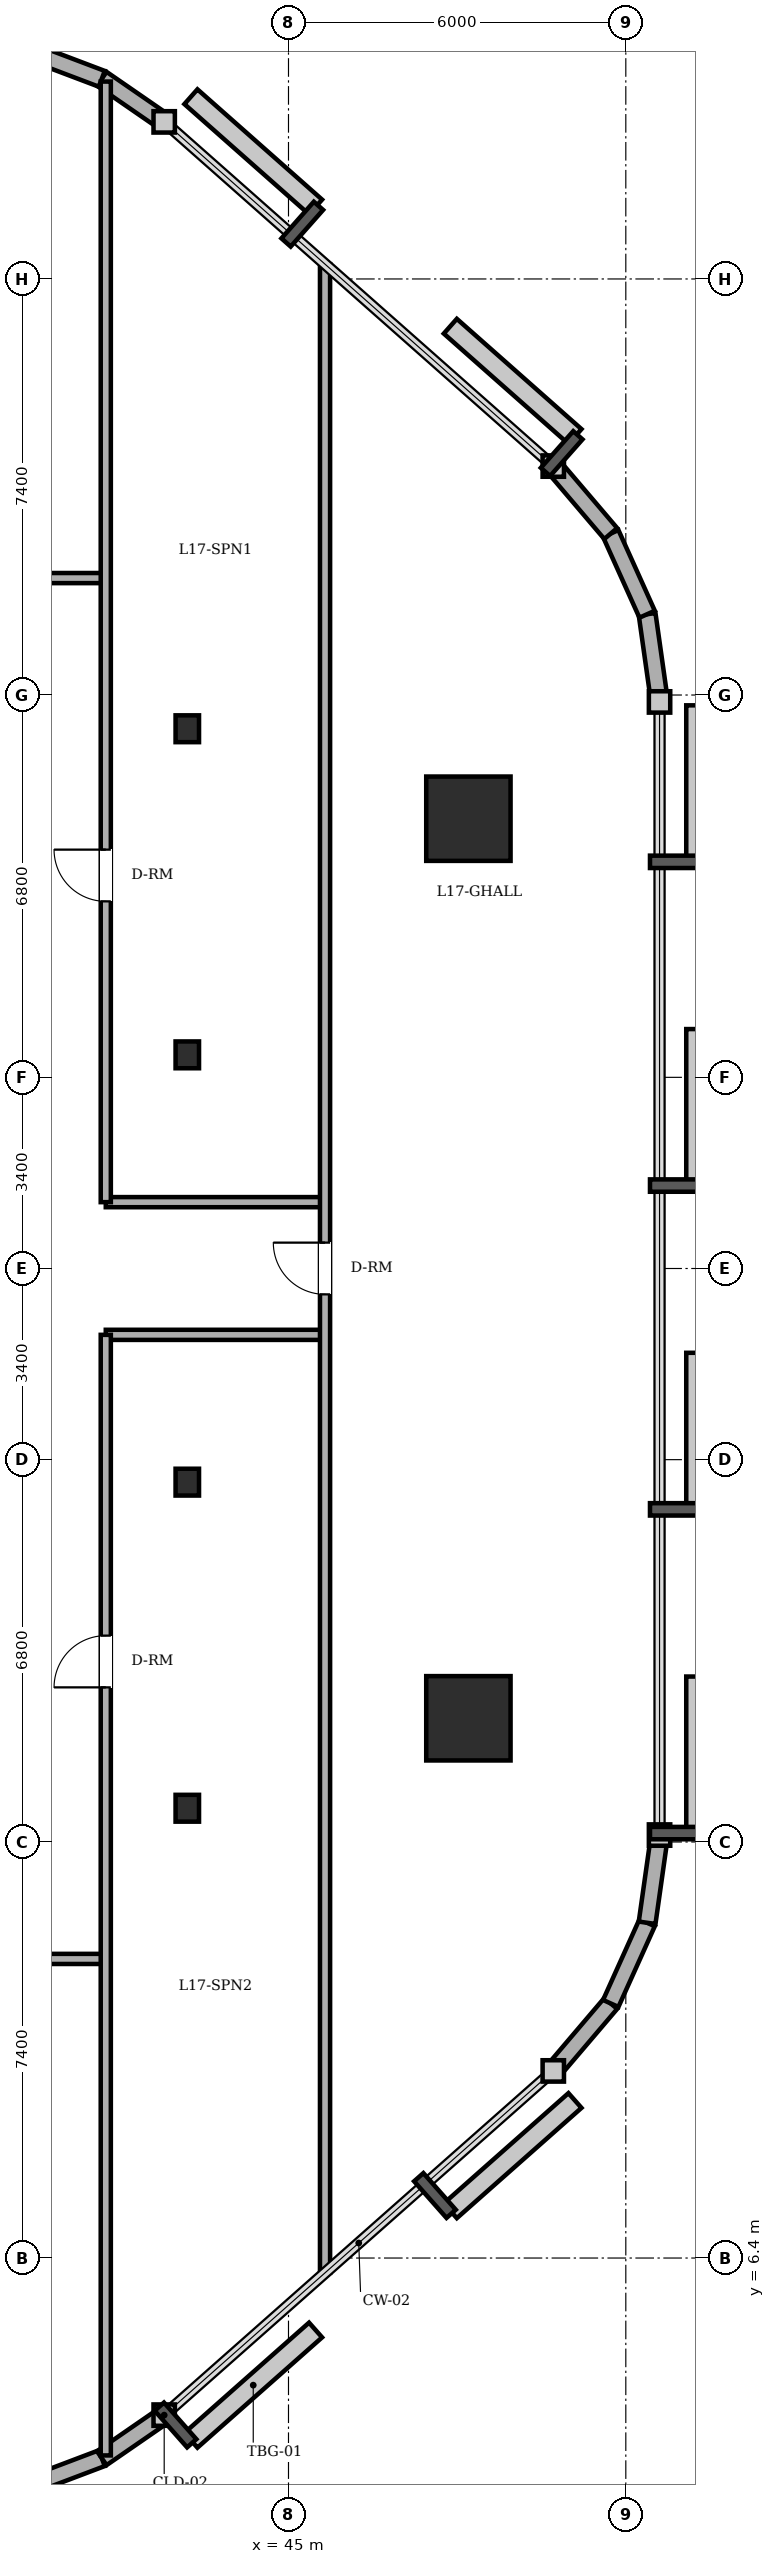
"""IFC4 building model, lengths in metres.
Left out: names, types, materials, properties, quantities, classifications, styles, units other than length and angle.
Written with IfcOpenShell. Run it as: python <this file> out.ifc"""

import sys

from ifc_helpers import new_model, si_unit, direction, frame, frame_2d, origin, origin_2d, place, context, subcontext, project, spatial, rectangle, circle, i_section, extrude, element, fill, save


model = new_model("IFC4")
c1 = context("Model", 3, precision=1e-05, world=origin(), true_north=direction((0.0, 1.0)))
c2 = subcontext(c1, "Body", "Model", "MODEL_VIEW")
j1 = project(units=[si_unit("LENGTHUNIT", "METRE"), si_unit("PLANEANGLEUNIT", "RADIAN")], contexts=[c1])
p1 = place(None, origin())
s1 = spatial("IfcSite", under=j1, at=p1, CompositionType="ELEMENT")
p2 = place(p1, origin())
s2 = spatial("IfcBuilding", under=s1, at=p2, CompositionType="ELEMENT")
p3 = place(p2, frame((0.0, 0.0, 64.8)))
s3 = spatial("IfcBuildingStorey", under=s2, at=p3, CompositionType="ELEMENT", Elevation=64.8)
for number, where, z_axis, x_axis in (
    (1, (48.2, 16.0, 0.0), (0.0, 0.0, 1.0), (1.0, 0.0, 0.0)),
    (2, (48.2, 32.0, 0.0), (0.0, 0.0, 1.0), (1.0, 0.0, 0.0)),
):
    element("IfcColumn", number, at=place(p3, frame(where, z_axis=z_axis, x_axis=x_axis)), inside=s3, PredefinedType="COLUMN", context=c2, shape_type="SweptSolid", body=[
        extrude(circle(Radius=0.75, at=origin_2d()), origin(), (0.0, 0.0, 1.0), 3.6),
    ])
for number, where, z_axis, x_axis in (
    (3, (43.2, 14.4, 0.0), (0.0, 0.0, 1.0), (1.0, 0.0, 0.0)),
    (4, (43.2, 20.2, 0.0), (0.0, 0.0, 1.0), (1.0, 0.0, 0.0)),
    (5, (43.2, 27.8, 0.0), (0.0, 0.0, 1.0), (1.0, 0.0, 0.0)),
    (6, (43.2, 33.6, 0.0), (0.0, 0.0, 1.0), (1.0, 0.0, 0.0)),
):
    element("IfcColumn", number, at=place(p3, frame(where, z_axis=z_axis, x_axis=x_axis)), inside=s3, PredefinedType="COLUMN", context=c2, shape_type="SweptSolid", body=[
        extrude(i_section(OverallWidth=0.417, OverallDepth=0.477, WebThickness=0.036, FlangeThickness=0.057, FilletRadius=0.015, at=origin_2d()), origin(), (0.0, 0.0, 1.0), 3.6),
    ])
p4 = place(p3, frame((40.417, 2.362, 0.0), z_axis=(0.0, 0.0, 1.0), x_axis=(0.935156721165, 0.354234254216, 0.0)))
e7 = element("IfcWall", 7, at=p4, inside=s3, PredefinedType="SOLIDWALL", context=c2, shape_type="SweptSolid", body=[
    extrude(rectangle(XDim=1.349, YDim=0.3, at=frame_2d((0.675, 0.0))), origin(), (0.0, 0.0, 1.0), 3.4),
])
p5 = place(p3, frame((41.679, 2.84, 0.0), z_axis=(0.0, 0.0, 1.0), x_axis=(0.823116500192, 0.567872544777, 0.0)))
e8 = element("IfcWall", 8, at=p5, inside=s3, PredefinedType="SOLIDWALL", context=c2, shape_type="SweptSolid", body=[
    extrude(rectangle(XDim=1.349, YDim=0.3, at=frame_2d((0.674, 0.0))), origin(), (0.0, 0.0, 1.0), 3.4),
])
p6 = place(p3, frame((49.71, 9.728, 0.0), z_axis=(0.0, 0.0, 1.0), x_axis=(0.648389989909, 0.7613083613, 0.0)))
e9 = element("IfcWall", 9, at=p6, inside=s3, PredefinedType="SOLIDWALL", context=c2, shape_type="SweptSolid", body=[
    extrude(rectangle(XDim=1.576, YDim=0.3, at=frame_2d((0.788, 0.0))), origin(), (0.0, 0.0, 1.0), 3.4),
])
p7 = place(p3, frame((50.732, 10.928, 0.0), z_axis=(0.0, 0.0, 1.0), x_axis=(0.410996558744, 0.911636895206, 0.0)))
e10 = element("IfcWall", 10, at=p7, inside=s3, PredefinedType="SOLIDWALL", context=c2, shape_type="SweptSolid", body=[
    extrude(rectangle(XDim=1.574, YDim=0.3, at=frame_2d((0.787, 0.0))), origin(), (0.0, 0.0, 1.0), 3.4),
])
for number, where, z_axis, x_axis in (
    (11, (51.379, 12.363, 0.0), (0.0, 0.0, 1.0), (0.14, 0.99, 0.0)),
    (12, (51.6, 34.077, 0.0), (0.0, 0.0, 1.0), (-0.14, 0.99, 0.0)),
):
    element("IfcWall", number, at=place(p3, frame(where, z_axis=z_axis, x_axis=x_axis)), inside=s3, PredefinedType="SOLIDWALL", context=c2, shape_type="SweptSolid", body=[
        extrude(rectangle(XDim=1.576, YDim=0.3, at=frame_2d((0.788, 0.0))), origin(), (0.0, 0.0, 1.0), 3.4),
    ])
p8 = place(p3, frame((51.379, 35.637, 0.0), z_axis=(0.0, 0.0, 1.0), x_axis=(-0.410996558744, 0.911636895206, 0.0)))
e13 = element("IfcWall", 13, at=p8, inside=s3, PredefinedType="SOLIDWALL", context=c2, shape_type="SweptSolid", body=[
    extrude(rectangle(XDim=1.574, YDim=0.3, at=frame_2d((0.787, 0.0))), origin(), (0.0, 0.0, 1.0), 3.4),
])
p9 = place(p3, frame((50.732, 37.072, 0.0), z_axis=(0.0, 0.0, 1.0), x_axis=(-0.648389989909, 0.7613083613, 0.0)))
e14 = element("IfcWall", 14, at=p9, inside=s3, PredefinedType="SOLIDWALL", context=c2, shape_type="SweptSolid", body=[
    extrude(rectangle(XDim=1.576, YDim=0.3, at=frame_2d((0.788, 0.0))), origin(), (0.0, 0.0, 1.0), 3.4),
])
p10 = place(p3, frame((42.789, 44.394, 0.0), z_axis=(0.0, 0.0, 1.0), x_axis=(-0.823116500192, 0.567872544777, 0.0)))
e15 = element("IfcWall", 15, at=p10, inside=s3, PredefinedType="SOLIDWALL", context=c2, shape_type="SweptSolid", body=[
    extrude(rectangle(XDim=1.349, YDim=0.3, at=frame_2d((0.674, 0.0))), origin(), (0.0, 0.0, 1.0), 3.4),
])
p11 = place(p3, frame((41.679, 45.16, 0.0), z_axis=(0.0, 0.0, 1.0), x_axis=(-0.935156721165, 0.354234254216, 0.0)))
e16 = element("IfcWall", 16, at=p11, inside=s3, PredefinedType="SOLIDWALL", context=c2, shape_type="SweptSolid", body=[
    extrude(rectangle(XDim=1.349, YDim=0.3, at=frame_2d((0.675, 0.0))), origin(), (0.0, 0.0, 1.0), 3.4),
])
p12 = place(p3, frame((3.4, 11.72, 0.0), z_axis=(0.0, 0.0, 1.0), x_axis=(1.0, 0.0, 0.0)))
e17 = element("IfcWall", 17, at=p12, inside=s3, PredefinedType="PARTITIONING", context=c2, shape_type="SweptSolid", body=[
    extrude(rectangle(XDim=38.35, YDim=0.18, at=frame_2d((19.175, 0.0))), origin(), (0.0, 0.0, 1.0), 3.4),
])
p13 = place(p12, frame((21.24, 0.0, 0.0)))
e18 = element("IfcOpeningElement", 18, at=p13, cuts=e17, PredefinedType="OPENING", context=c2, shape_type="SweptSolid", body=[
    extrude(rectangle(XDim=0.92, YDim=2.1, at=frame_2d((0.46, 1.05))), frame((0.0, 0.1, 0.0), z_axis=(0.0, -1.0, 0.0), x_axis=(1.0, 0.0, 0.0)), (0.0, 0.0, 1.0), 0.2),
])
p14 = place(p12, frame((10.74, 0.0, 0.0)))
e19 = element("IfcOpeningElement", 19, at=p14, cuts=e17, PredefinedType="OPENING", context=c2, shape_type="SweptSolid", body=[
    extrude(rectangle(XDim=0.92, YDim=2.1, at=frame_2d((0.46, 1.05))), frame((0.0, 0.1, 0.0), z_axis=(0.0, -1.0, 0.0), x_axis=(1.0, 0.0, 0.0)), (0.0, 0.0, 1.0), 0.2),
])
p15 = place(p12, frame((30.255, 0.0, 0.0)))
e20 = element("IfcOpeningElement", 20, at=p15, cuts=e17, PredefinedType="OPENING", context=c2, shape_type="SweptSolid", body=[
    extrude(rectangle(XDim=0.92, YDim=2.1, at=frame_2d((0.46, 1.05))), frame((0.0, 0.1, 0.0), z_axis=(0.0, -1.0, 0.0), x_axis=(1.0, 0.0, 0.0)), (0.0, 0.0, 1.0), 0.2),
])
for number, where, z_axis, x_axis in (
    (21, (41.75, 22.82, 0.0), (0.0, 0.0, 1.0), (1.0, 0.0, 0.0)),
    (22, (41.75, 25.18, 0.0), (0.0, 0.0, 1.0), (1.0, 0.0, 0.0)),
):
    element("IfcWall", number, at=place(p3, frame(where, z_axis=z_axis, x_axis=x_axis)), inside=s3, PredefinedType="PARTITIONING", context=c2, shape_type="SweptSolid", body=[
        extrude(rectangle(XDim=3.9, YDim=0.18, at=frame_2d((1.95, 0.0))), origin(), (0.0, 0.0, 1.0), 3.4),
    ])
p16 = place(p3, frame((3.4, 36.28, 0.0), z_axis=(0.0, 0.0, 1.0), x_axis=(1.0, 0.0, 0.0)))
e23 = element("IfcWall", 23, at=p16, inside=s3, PredefinedType="PARTITIONING", context=c2, shape_type="SweptSolid", body=[
    extrude(rectangle(XDim=38.35, YDim=0.18, at=frame_2d((19.175, 0.0))), origin(), (0.0, 0.0, 1.0), 3.4),
])
p17 = place(p16, frame((21.05, 0.0, 0.0)))
e24 = element("IfcOpeningElement", 24, at=p17, cuts=e23, PredefinedType="OPENING", context=c2, shape_type="SweptSolid", body=[
    extrude(rectangle(XDim=0.9, YDim=2.1, at=frame_2d((0.45, 1.05))), frame((0.0, 0.1, 0.0), z_axis=(0.0, -1.0, 0.0), x_axis=(1.0, 0.0, 0.0)), (0.0, 0.0, 1.0), 0.2),
])
p18 = place(p16, frame((24.67, 0.0, 0.0)))
e25 = element("IfcOpeningElement", 25, at=p18, cuts=e23, PredefinedType="OPENING", context=c2, shape_type="SweptSolid", body=[
    extrude(rectangle(XDim=0.86, YDim=2.1, at=frame_2d((0.43, 1.05))), frame((0.0, 0.1, 0.0), z_axis=(0.0, -1.0, 0.0), x_axis=(1.0, 0.0, 0.0)), (0.0, 0.0, 1.0), 0.2),
])
p19 = place(p16, frame((10.74, 0.0, 0.0)))
e26 = element("IfcOpeningElement", 26, at=p19, cuts=e23, PredefinedType="OPENING", context=c2, shape_type="SweptSolid", body=[
    extrude(rectangle(XDim=0.92, YDim=2.1, at=frame_2d((0.46, 1.05))), frame((0.0, 0.1, 0.0), z_axis=(0.0, -1.0, 0.0), x_axis=(1.0, 0.0, 0.0)), (0.0, 0.0, 1.0), 0.2),
])
p20 = place(p16, frame((31.915, 0.0, 0.0)))
e27 = element("IfcOpeningElement", 27, at=p20, cuts=e23, PredefinedType="OPENING", context=c2, shape_type="SweptSolid", body=[
    extrude(rectangle(XDim=1.0, YDim=2.15, at=frame_2d((0.5, 1.075))), frame((0.0, 0.1, 0.0), z_axis=(0.0, -1.0, 0.0), x_axis=(1.0, 0.0, 0.0)), (0.0, 0.0, 1.0), 0.2),
])
p21 = place(p3, frame((41.75, 2.889, 0.0), z_axis=(0.0, 0.0, 1.0), x_axis=(0.0, 1.0, 0.0)))
e28 = element("IfcWall", 28, at=p21, inside=s3, PredefinedType="PARTITIONING", context=c2, shape_type="SweptSolid", body=[
    extrude(rectangle(XDim=19.931, YDim=0.18, at=frame_2d((9.966, 0.0))), origin(), (0.0, 0.0, 1.0), 2.782),
])
p22 = place(p21, frame((13.661, 0.0, 0.0)))
e29 = element("IfcOpeningElement", 29, at=p22, cuts=e28, PredefinedType="OPENING", context=c2, shape_type="SweptSolid", body=[
    extrude(rectangle(XDim=0.92, YDim=2.1, at=frame_2d((0.46, 1.05))), frame((0.0, 0.1, 0.0), z_axis=(0.0, -1.0, 0.0), x_axis=(1.0, 0.0, 0.0)), (0.0, 0.0, 1.0), 0.2),
])
p23 = place(p3, frame((41.75, 25.18, 0.0), z_axis=(0.0, 0.0, 1.0), x_axis=(0.0, 1.0, 0.0)))
e30 = element("IfcWall", 30, at=p23, inside=s3, PredefinedType="PARTITIONING", context=c2, shape_type="SweptSolid", body=[
    extrude(rectangle(XDim=19.931, YDim=0.18, at=frame_2d((9.966, 0.0))), origin(), (0.0, 0.0, 1.0), 2.782),
])
p24 = place(p23, frame((5.35, 0.0, 0.0)))
e31 = element("IfcOpeningElement", 31, at=p24, cuts=e30, PredefinedType="OPENING", context=c2, shape_type="SweptSolid", body=[
    extrude(rectangle(XDim=0.92, YDim=2.1, at=frame_2d((0.46, 1.05))), frame((0.0, 0.1, 0.0), z_axis=(0.0, -1.0, 0.0), x_axis=(1.0, 0.0, 0.0)), (0.0, 0.0, 1.0), 0.2),
])
p25 = place(p3, frame((45.65, 6.137, 0.0), z_axis=(0.0, 0.0, 1.0), x_axis=(0.0, 1.0, 0.0)))
e32 = element("IfcWall", 32, at=p25, inside=s3, PredefinedType="PARTITIONING", context=c2, shape_type="SweptSolid", body=[
    extrude(rectangle(XDim=35.726, YDim=0.18, at=frame_2d((17.863, 0.0))), origin(), (0.0, 0.0, 1.0), 3.4),
])
p26 = place(p25, frame((17.403, 0.0, 0.0)))
e33 = element("IfcOpeningElement", 33, at=p26, cuts=e32, PredefinedType="OPENING", context=c2, shape_type="SweptSolid", body=[
    extrude(rectangle(XDim=0.92, YDim=2.1, at=frame_2d((0.46, 1.05))), frame((0.0, 0.1, 0.0), z_axis=(0.0, -1.0, 0.0), x_axis=(1.0, 0.0, 0.0)), (0.0, 0.0, 1.0), 0.2),
])
p27 = place(p24, origin())
e34 = element("IfcDoor", 34, at=p27, inside=s3, OperationType="SINGLE_SWING_RIGHT", PredefinedType="DOOR", context=c2, shape_type="SweptSolid", body=[
    extrude(rectangle(XDim=0.92, YDim=2.1, at=frame_2d((0.46, 1.05))), frame((0.0, 0.025, 0.0), z_axis=(0.0, -1.0, 0.0), x_axis=(1.0, 0.0, 0.0)), (0.0, 0.0, 1.0), 0.05),
])
fill(e31, e34)
p28 = place(p22, origin())
e35 = element("IfcDoor", 35, at=p28, inside=s3, OperationType="SINGLE_SWING_LEFT", PredefinedType="DOOR", context=c2, shape_type="SweptSolid", body=[
    extrude(rectangle(XDim=0.92, YDim=2.1, at=frame_2d((0.46, 1.05))), frame((0.0, 0.025, 0.0), z_axis=(0.0, -1.0, 0.0), x_axis=(1.0, 0.0, 0.0)), (0.0, 0.0, 1.0), 0.05),
])
fill(e29, e35)
p29 = place(p26, origin())
e36 = element("IfcDoor", 36, at=p29, inside=s3, OperationType="SINGLE_SWING_RIGHT", PredefinedType="DOOR", context=c2, shape_type="SweptSolid", body=[
    extrude(rectangle(XDim=0.92, YDim=2.1, at=frame_2d((0.46, 1.05))), frame((0.0, 0.025, 0.0), z_axis=(0.0, -1.0, 0.0), x_axis=(1.0, 0.0, 0.0)), (0.0, 0.0, 1.0), 0.05),
])
fill(e33, e36)
save(model, sys.argv[1])
